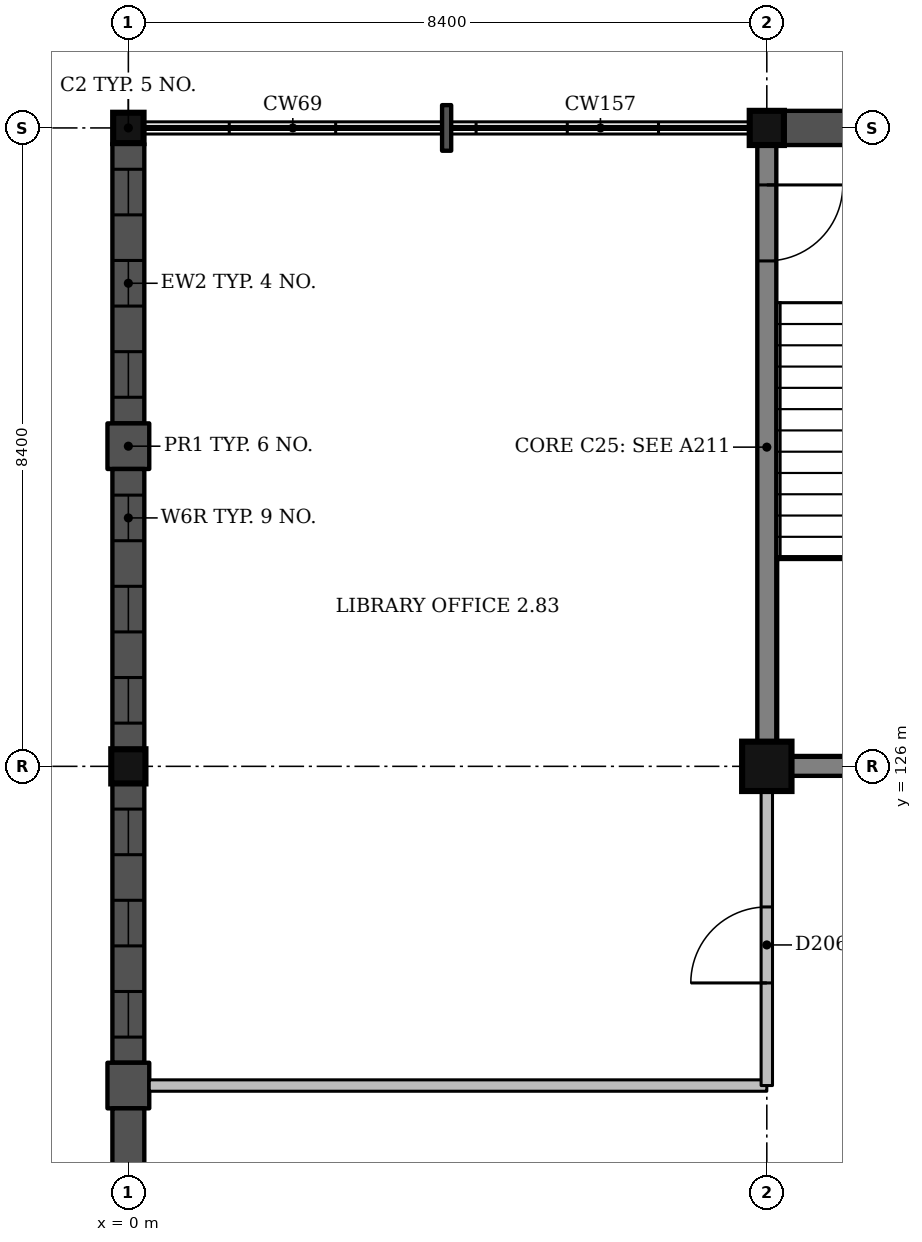
"""IFC4 building model, lengths in metres.
Left out: names, types, materials, properties, quantities, classifications, styles, units other than length and angle.
Written with IfcOpenShell. Run it as: python <this file> out.ifc"""

import sys

from ifc_helpers import new_model, si_unit, direction, frame, frame_2d, origin, origin_2d, place, context, subcontext, project, spatial, rectangle, extrude, element, fill, save


model = new_model("IFC4")
c1 = context("Model", 3, precision=1e-05, world=origin(), true_north=direction((0.0, 1.0)))
c2 = subcontext(c1, "Body", "Model", "MODEL_VIEW")
j1 = project(units=[si_unit("LENGTHUNIT", "METRE"), si_unit("PLANEANGLEUNIT", "RADIAN")], contexts=[c1])
p1 = place(None, origin())
s1 = spatial("IfcSite", under=j1, at=p1, CompositionType="ELEMENT")
p2 = place(p1, origin())
s2 = spatial("IfcBuilding", under=s1, at=p2, CompositionType="ELEMENT")
p3 = place(p2, frame((0.0, 0.0, 9.0)))
s3 = spatial("IfcBuildingStorey", under=s2, at=p3, CompositionType="ELEMENT", Elevation=9.0)
p4 = place(p3, frame((0.0, 126.0, -1.5), z_axis=(0.0, 0.0, 1.0), x_axis=(1.0, 0.0, 0.0)))
e1 = element("IfcColumn", 1, at=p4, inside=s3, PredefinedType="COLUMN", context=c2, shape_type="SweptSolid", body=[
    extrude(rectangle(XDim=0.45, YDim=0.45, at=origin_2d()), origin(), (0.0, 0.0, 1.0), 6.0),
])
p5 = place(p3, frame((0.0, 134.4, -1.5), z_axis=(0.0, 0.0, 1.0), x_axis=(1.0, 0.0, 0.0)))
e2 = element("IfcColumn", 2, at=p5, inside=s3, PredefinedType="COLUMN", context=c2, shape_type="SweptSolid", body=[
    extrude(rectangle(XDim=0.4, YDim=0.4, at=origin_2d()), origin(), (0.0, 0.0, 1.0), 6.0),
])
p6 = place(p3, frame((8.4, 126.0, -1.5), z_axis=(0.0, 0.0, 1.0), x_axis=(1.0, 0.0, 0.0)))
e3 = element("IfcColumn", 3, at=p6, inside=s3, PredefinedType="COLUMN", context=c2, shape_type="SweptSolid", body=[
    extrude(rectangle(XDim=0.65, YDim=0.65, at=origin_2d()), origin(), (0.0, 0.0, 1.0), 6.0),
])
p7 = place(p3, frame((8.4, 134.4, -1.5), z_axis=(0.0, 0.0, 1.0), x_axis=(1.0, 0.0, 0.0)))
e4 = element("IfcColumn", 4, at=p7, inside=s3, PredefinedType="COLUMN", context=c2, shape_type="SweptSolid", body=[
    extrude(rectangle(XDim=0.45, YDim=0.45, at=origin_2d()), origin(), (0.0, 0.0, 1.0), 6.0),
])
p8 = place(p3, frame((8.725, 126.0, 0.0), z_axis=(0.0, 0.0, 1.0), x_axis=(1.0, 0.0, 0.0)))
e5 = element("IfcWall", 5, at=p8, inside=s3, PredefinedType="SHEAR", context=c2, shape_type="SweptSolid", body=[
    extrude(rectangle(XDim=5.175, YDim=0.25, at=frame_2d((2.587, 0.0))), origin(), (0.0, 0.0, 1.0), 4.5),
])
p9 = place(p3, frame((8.4, 126.325, 0.0), z_axis=(0.0, 0.0, 1.0), x_axis=(0.0, 1.0, 0.0)))
e6 = element("IfcWall", 6, at=p9, inside=s3, PredefinedType="SHEAR", context=c2, shape_type="SweptSolid", body=[
    extrude(rectangle(XDim=7.85, YDim=0.25, at=frame_2d((3.925, 0.0))), origin(), (0.0, 0.0, 1.0), 4.5),
])
p10 = place(p9, frame((6.325, 0.0, 0.0)))
e7 = element("IfcOpeningElement", 7, at=p10, cuts=e6, PredefinedType="OPENING", context=c2, shape_type="SweptSolid", body=[
    extrude(rectangle(XDim=1.0, YDim=2.1, at=frame_2d((0.5, 1.05))), frame((0.0, 0.135, 0.0), z_axis=(0.0, -1.0, 0.0), x_axis=(1.0, 0.0, 0.0)), (0.0, 0.0, 1.0), 0.27),
])
p11 = place(p3, frame((12.54, 134.4, 0.0), z_axis=(0.0, 0.0, 1.0), x_axis=(-1.0, 0.0, 0.0)))
e8 = element("IfcWall", 8, at=p11, inside=s3, PredefinedType="SOLIDWALL", context=c2, shape_type="SweptSolid", body=[
    extrude(rectangle(XDim=3.915, YDim=0.45, at=frame_2d((1.958, 0.0))), origin(), (0.0, 0.0, 1.0), 3.35),
])
p12 = place(p11, frame((1.865, 0.0, 0.0), z_axis=(0.0, 0.0, 1.0), x_axis=(-1.0, 0.0, 0.0)))
e9 = element("IfcOpeningElement", 9, at=p12, cuts=e8, PredefinedType="OPENING", context=c2, shape_type="SweptSolid", body=[
    extrude(rectangle(XDim=1.0, YDim=2.1, at=frame_2d((0.5, 1.05))), frame((0.0, 0.235, 0.0), z_axis=(0.0, -1.0, 0.0), x_axis=(1.0, 0.0, 0.0)), (0.0, 0.0, 1.0), 0.47),
])
p13 = place(p3, frame((4.248, 134.4, 0.0), z_axis=(0.0, 0.0, 1.0), x_axis=(-1.0, 0.0, 0.0)))
e10 = element("IfcWall", 10, at=p13, inside=s3, PredefinedType="SOLIDWALL", context=c2, shape_type="SweptSolid", body=[
    extrude(rectangle(XDim=0.12, YDim=0.6, at=frame_2d((0.06, 0.0))), origin(), (0.0, 0.0, 1.0), 3.35),
])
p14 = place(p3, frame((0.0, 134.2, 0.0), z_axis=(0.0, 0.0, 1.0), x_axis=(0.0, -1.0, 0.0)))
e11 = element("IfcWall", 11, at=p14, inside=s3, PredefinedType="SOLIDWALL", context=c2, shape_type="SweptSolid", body=[
    extrude(rectangle(XDim=3.688, YDim=0.42, at=frame_2d((1.844, 0.0))), origin(), (0.0, 0.0, 1.0), 3.35),
])
p15 = place(p14, frame((0.344, 0.0, 1.0)))
e12 = element("IfcOpeningElement", 12, at=p15, cuts=e11, PredefinedType="OPENING", context=c2, shape_type="SweptSolid", body=[
    extrude(rectangle(XDim=0.6, YDim=1.8, at=frame_2d((0.3, 0.9))), frame((0.0, 0.22, 0.0), z_axis=(0.0, -1.0, 0.0), x_axis=(1.0, 0.0, 0.0)), (0.0, 0.0, 1.0), 0.44),
])
p16 = place(p14, frame((1.544, 0.0, 1.0)))
e13 = element("IfcOpeningElement", 13, at=p16, cuts=e11, PredefinedType="OPENING", context=c2, shape_type="SweptSolid", body=[
    extrude(rectangle(XDim=0.6, YDim=1.8, at=frame_2d((0.3, 0.9))), frame((0.0, 0.22, 0.0), z_axis=(0.0, -1.0, 0.0), x_axis=(1.0, 0.0, 0.0)), (0.0, 0.0, 1.0), 0.44),
])
p17 = place(p14, frame((2.744, 0.0, 1.0)))
e14 = element("IfcOpeningElement", 14, at=p17, cuts=e11, PredefinedType="OPENING", context=c2, shape_type="SweptSolid", body=[
    extrude(rectangle(XDim=0.6, YDim=1.8, at=frame_2d((0.3, 0.9))), frame((0.0, 0.22, 0.0), z_axis=(0.0, -1.0, 0.0), x_axis=(1.0, 0.0, 0.0)), (0.0, 0.0, 1.0), 0.44),
])
p18 = place(p3, frame((0.0, 130.512, 0.0), z_axis=(0.0, 0.0, 1.0), x_axis=(0.0, -1.0, 0.0)))
e15 = element("IfcWall", 15, at=p18, inside=s3, PredefinedType="SOLIDWALL", context=c2, shape_type="SweptSolid", body=[
    extrude(rectangle(XDim=0.6, YDim=0.55, at=frame_2d((0.3, 0.0))), origin(), (0.0, 0.0, 1.0), 3.35),
])
p19 = place(p3, frame((0.0, 129.913, 0.0), z_axis=(0.0, 0.0, 1.0), x_axis=(0.0, -1.0, 0.0)))
e16 = element("IfcWall", 16, at=p19, inside=s3, PredefinedType="SOLIDWALL", context=c2, shape_type="SweptSolid", body=[
    extrude(rectangle(XDim=3.688, YDim=0.42, at=frame_2d((1.844, 0.0))), origin(), (0.0, 0.0, 1.0), 3.35),
])
p20 = place(p19, frame((0.344, 0.0, 1.0)))
e17 = element("IfcOpeningElement", 17, at=p20, cuts=e16, PredefinedType="OPENING", context=c2, shape_type="SweptSolid", body=[
    extrude(rectangle(XDim=0.6, YDim=1.8, at=frame_2d((0.3, 0.9))), frame((0.0, 0.22, 0.0), z_axis=(0.0, -1.0, 0.0), x_axis=(1.0, 0.0, 0.0)), (0.0, 0.0, 1.0), 0.44),
])
p21 = place(p19, frame((1.544, 0.0, 1.0)))
e18 = element("IfcOpeningElement", 18, at=p21, cuts=e16, PredefinedType="OPENING", context=c2, shape_type="SweptSolid", body=[
    extrude(rectangle(XDim=0.6, YDim=1.8, at=frame_2d((0.3, 0.9))), frame((0.0, 0.22, 0.0), z_axis=(0.0, -1.0, 0.0), x_axis=(1.0, 0.0, 0.0)), (0.0, 0.0, 1.0), 0.44),
])
p22 = place(p19, frame((2.744, 0.0, 1.0)))
e19 = element("IfcOpeningElement", 19, at=p22, cuts=e16, PredefinedType="OPENING", context=c2, shape_type="SweptSolid", body=[
    extrude(rectangle(XDim=0.6, YDim=1.8, at=frame_2d((0.3, 0.9))), frame((0.0, 0.22, 0.0), z_axis=(0.0, -1.0, 0.0), x_axis=(1.0, 0.0, 0.0)), (0.0, 0.0, 1.0), 0.44),
])
p23 = place(p3, frame((0.0, 125.775, 0.0), z_axis=(0.0, 0.0, 1.0), x_axis=(0.0, -1.0, 0.0)))
e20 = element("IfcWall", 20, at=p23, inside=s3, PredefinedType="SOLIDWALL", context=c2, shape_type="SweptSolid", body=[
    extrude(rectangle(XDim=3.675, YDim=0.42, at=frame_2d((1.837, 0.0))), origin(), (0.0, 0.0, 1.0), 3.35),
])
p24 = place(p23, frame((0.337, 0.0, 1.0)))
e21 = element("IfcOpeningElement", 21, at=p24, cuts=e20, PredefinedType="OPENING", context=c2, shape_type="SweptSolid", body=[
    extrude(rectangle(XDim=0.6, YDim=1.8, at=frame_2d((0.3, 0.9))), frame((0.0, 0.22, 0.0), z_axis=(0.0, -1.0, 0.0), x_axis=(1.0, 0.0, 0.0)), (0.0, 0.0, 1.0), 0.44),
])
p25 = place(p23, frame((1.538, 0.0, 1.0)))
e22 = element("IfcOpeningElement", 22, at=p25, cuts=e20, PredefinedType="OPENING", context=c2, shape_type="SweptSolid", body=[
    extrude(rectangle(XDim=0.6, YDim=1.8, at=frame_2d((0.3, 0.9))), frame((0.0, 0.22, 0.0), z_axis=(0.0, -1.0, 0.0), x_axis=(1.0, 0.0, 0.0)), (0.0, 0.0, 1.0), 0.44),
])
p26 = place(p23, frame((2.738, 0.0, 1.0)))
e23 = element("IfcOpeningElement", 23, at=p26, cuts=e20, PredefinedType="OPENING", context=c2, shape_type="SweptSolid", body=[
    extrude(rectangle(XDim=0.6, YDim=1.8, at=frame_2d((0.3, 0.9))), frame((0.0, 0.22, 0.0), z_axis=(0.0, -1.0, 0.0), x_axis=(1.0, 0.0, 0.0)), (0.0, 0.0, 1.0), 0.44),
])
p27 = place(p3, frame((0.0, 122.1, 0.0), z_axis=(0.0, 0.0, 1.0), x_axis=(0.0, -1.0, 0.0)))
e24 = element("IfcWall", 24, at=p27, inside=s3, PredefinedType="SOLIDWALL", context=c2, shape_type="SweptSolid", body=[
    extrude(rectangle(XDim=0.6, YDim=0.55, at=frame_2d((0.3, 0.0))), origin(), (0.0, 0.0, 1.0), 3.35),
])
p28 = place(p3, frame((0.0, 121.5, 0.0), z_axis=(0.0, 0.0, 1.0), x_axis=(0.0, -1.0, 0.0)))
e25 = element("IfcWall", 25, at=p28, inside=s3, PredefinedType="SOLIDWALL", context=c2, shape_type="SweptSolid", body=[
    extrude(rectangle(XDim=3.675, YDim=0.42, at=frame_2d((1.837, 0.0))), origin(), (0.0, 0.0, 1.0), 3.35),
])
p29 = place(p28, frame((1.337, 0.0, 0.0)))
e26 = element("IfcOpeningElement", 26, at=p29, cuts=e25, PredefinedType="OPENING", context=c2, shape_type="SweptSolid", body=[
    extrude(rectangle(XDim=1.0, YDim=2.1, at=frame_2d((0.5, 1.05))), frame((0.0, 0.22, 0.0), z_axis=(0.0, -1.0, 0.0), x_axis=(1.0, 0.0, 0.0)), (0.0, 0.0, 1.0), 0.44),
])
p30 = place(p3, frame((0.275, 121.8, 0.0), z_axis=(0.0, 0.0, 1.0), x_axis=(1.0, 0.0, 0.0)))
e27 = element("IfcWall", 27, at=p30, inside=s3, PredefinedType="PARTITIONING", context=c2, shape_type="SweptSolid", body=[
    extrude(rectangle(XDim=8.125, YDim=0.15, at=frame_2d((4.062, 0.0))), origin(), (0.0, 0.0, 1.0), 3.4),
])
p31 = place(p3, frame((8.4, 121.8, 0.0), z_axis=(0.0, 0.0, 1.0), x_axis=(0.0, 1.0, 0.0)))
e28 = element("IfcWall", 28, at=p31, inside=s3, PredefinedType="PARTITIONING", context=c2, shape_type="SweptSolid", body=[
    extrude(rectangle(XDim=3.875, YDim=0.15, at=frame_2d((1.938, 0.0))), origin(), (0.0, 0.0, 1.0), 3.4),
])
p32 = place(p31, frame((1.35, 0.0, 0.0)))
e29 = element("IfcOpeningElement", 29, at=p32, cuts=e28, PredefinedType="OPENING", context=c2, shape_type="SweptSolid", body=[
    extrude(rectangle(XDim=1.0, YDim=2.1, at=frame_2d((0.5, 1.05))), frame((0.0, 0.085, 0.0), z_axis=(0.0, -1.0, 0.0), x_axis=(1.0, 0.0, 0.0)), (0.0, 0.0, 1.0), 0.17),
])
p33 = place(p15, origin())
e30 = element("IfcWindow", 30, at=p33, inside=s3, PartitioningType="SINGLE_PANEL", PredefinedType="WINDOW", context=c2, shape_type="SweptSolid", body=[
    extrude(rectangle(XDim=0.6, YDim=1.8, at=frame_2d((0.3, 0.9))), frame((0.0, 0.15, 0.0), z_axis=(0.0, -1.0, 0.0), x_axis=(1.0, 0.0, 0.0)), (0.0, 0.0, 1.0), 0.06),
])
fill(e12, e30)
p34 = place(p16, origin())
e31 = element("IfcWindow", 31, at=p34, inside=s3, PartitioningType="SINGLE_PANEL", PredefinedType="WINDOW", context=c2, shape_type="SweptSolid", body=[
    extrude(rectangle(XDim=0.6, YDim=1.8, at=frame_2d((0.3, 0.9))), frame((0.0, 0.15, 0.0), z_axis=(0.0, -1.0, 0.0), x_axis=(1.0, 0.0, 0.0)), (0.0, 0.0, 1.0), 0.06),
])
fill(e13, e31)
p35 = place(p17, origin())
e32 = element("IfcWindow", 32, at=p35, inside=s3, PartitioningType="SINGLE_PANEL", PredefinedType="WINDOW", context=c2, shape_type="SweptSolid", body=[
    extrude(rectangle(XDim=0.6, YDim=1.8, at=frame_2d((0.3, 0.9))), frame((0.0, 0.15, 0.0), z_axis=(0.0, -1.0, 0.0), x_axis=(1.0, 0.0, 0.0)), (0.0, 0.0, 1.0), 0.06),
])
fill(e14, e32)
p36 = place(p20, origin())
e33 = element("IfcWindow", 33, at=p36, inside=s3, PartitioningType="SINGLE_PANEL", PredefinedType="WINDOW", context=c2, shape_type="SweptSolid", body=[
    extrude(rectangle(XDim=0.6, YDim=1.8, at=frame_2d((0.3, 0.9))), frame((0.0, 0.15, 0.0), z_axis=(0.0, -1.0, 0.0), x_axis=(1.0, 0.0, 0.0)), (0.0, 0.0, 1.0), 0.06),
])
fill(e17, e33)
p37 = place(p21, origin())
e34 = element("IfcWindow", 34, at=p37, inside=s3, PartitioningType="SINGLE_PANEL", PredefinedType="WINDOW", context=c2, shape_type="SweptSolid", body=[
    extrude(rectangle(XDim=0.6, YDim=1.8, at=frame_2d((0.3, 0.9))), frame((0.0, 0.15, 0.0), z_axis=(0.0, -1.0, 0.0), x_axis=(1.0, 0.0, 0.0)), (0.0, 0.0, 1.0), 0.06),
])
fill(e18, e34)
p38 = place(p22, origin())
e35 = element("IfcWindow", 35, at=p38, inside=s3, PartitioningType="SINGLE_PANEL", PredefinedType="WINDOW", context=c2, shape_type="SweptSolid", body=[
    extrude(rectangle(XDim=0.6, YDim=1.8, at=frame_2d((0.3, 0.9))), frame((0.0, 0.15, 0.0), z_axis=(0.0, -1.0, 0.0), x_axis=(1.0, 0.0, 0.0)), (0.0, 0.0, 1.0), 0.06),
])
fill(e19, e35)
p39 = place(p24, origin())
e36 = element("IfcWindow", 36, at=p39, inside=s3, PartitioningType="SINGLE_PANEL", PredefinedType="WINDOW", context=c2, shape_type="SweptSolid", body=[
    extrude(rectangle(XDim=0.6, YDim=1.8, at=frame_2d((0.3, 0.9))), frame((0.0, 0.15, 0.0), z_axis=(0.0, -1.0, 0.0), x_axis=(1.0, 0.0, 0.0)), (0.0, 0.0, 1.0), 0.06),
])
fill(e21, e36)
p40 = place(p25, origin())
e37 = element("IfcWindow", 37, at=p40, inside=s3, PartitioningType="SINGLE_PANEL", PredefinedType="WINDOW", context=c2, shape_type="SweptSolid", body=[
    extrude(rectangle(XDim=0.6, YDim=1.8, at=frame_2d((0.3, 0.9))), frame((0.0, 0.15, 0.0), z_axis=(0.0, -1.0, 0.0), x_axis=(1.0, 0.0, 0.0)), (0.0, 0.0, 1.0), 0.06),
])
fill(e22, e37)
p41 = place(p26, origin())
e38 = element("IfcWindow", 38, at=p41, inside=s3, PartitioningType="SINGLE_PANEL", PredefinedType="WINDOW", context=c2, shape_type="SweptSolid", body=[
    extrude(rectangle(XDim=0.6, YDim=1.8, at=frame_2d((0.3, 0.9))), frame((0.0, 0.15, 0.0), z_axis=(0.0, -1.0, 0.0), x_axis=(1.0, 0.0, 0.0)), (0.0, 0.0, 1.0), 0.06),
])
fill(e23, e38)
p42 = place(p32, origin())
e39 = element("IfcDoor", 39, at=p42, inside=s3, OperationType="SINGLE_SWING_LEFT", PredefinedType="DOOR", context=c2, shape_type="SweptSolid", body=[
    extrude(rectangle(XDim=1.0, YDim=2.1, at=frame_2d((0.5, 1.05))), frame((0.0, 0.025, 0.0), z_axis=(0.0, -1.0, 0.0), x_axis=(1.0, 0.0, 0.0)), (0.0, 0.0, 1.0), 0.05),
])
fill(e29, e39)
p43 = place(p10, origin())
e40 = element("IfcDoor", 40, at=p43, inside=s3, OperationType="SINGLE_SWING_RIGHT", PredefinedType="DOOR", context=c2, shape_type="SweptSolid", body=[
    extrude(rectangle(XDim=1.0, YDim=2.1, at=frame_2d((0.5, 1.05))), frame((0.0, 0.025, 0.0), z_axis=(0.0, -1.0, 0.0), x_axis=(1.0, 0.0, 0.0)), (0.0, 0.0, 1.0), 0.05),
])
fill(e7, e40)
save(model, sys.argv[1])
